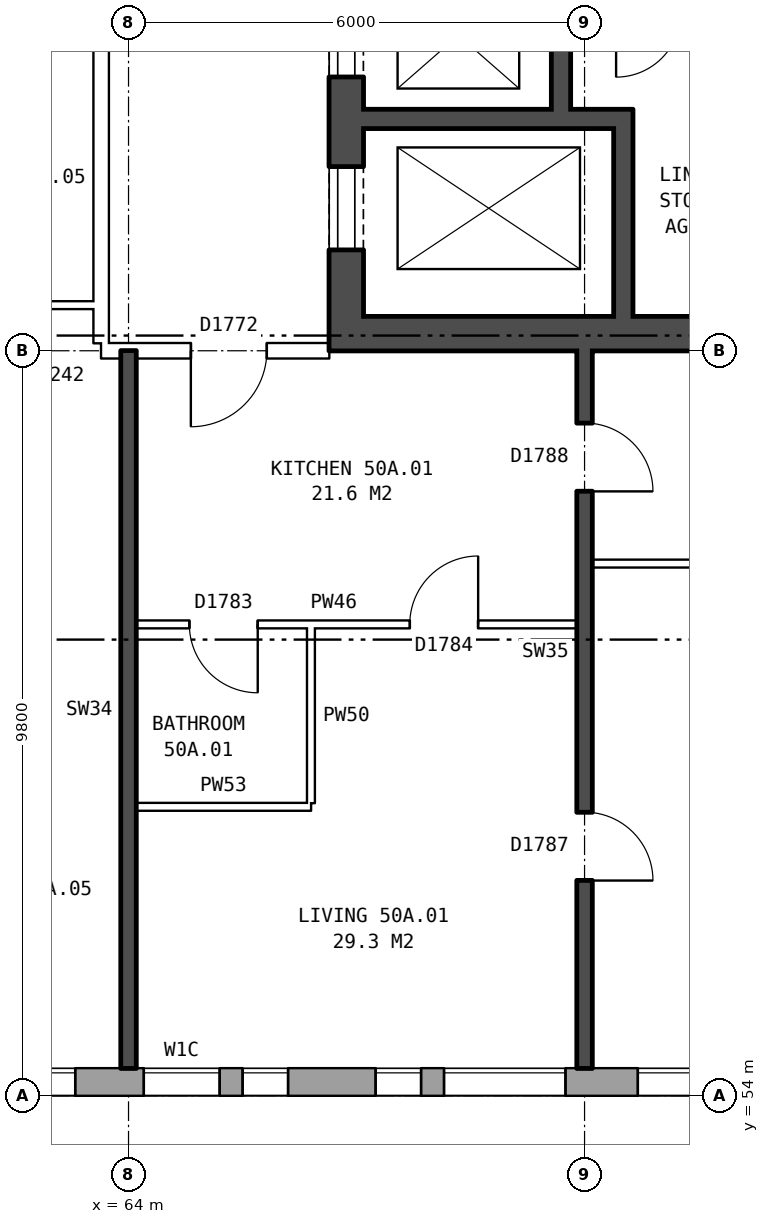
"""IFC4 building model, lengths in metres.
Left out: names, types, materials, properties, quantities, classifications, styles, units other than length and angle.
Written with IfcOpenShell. Run it as: python <this file> out.ifc"""

import sys

from ifc_helpers import new_model, si_unit, direction, frame, frame_2d, origin, place, context, subcontext, project, spatial, rectangle, extrude, element, fill, save


model = new_model("IFC4")
c1 = context("Model", 3, precision=1e-05, world=origin(), true_north=direction((0.0, 1.0)))
c2 = subcontext(c1, "Body", "Model", "MODEL_VIEW")
j1 = project(units=[si_unit("LENGTHUNIT", "METRE"), si_unit("PLANEANGLEUNIT", "RADIAN")], contexts=[c1])
p1 = place(None, origin())
s1 = spatial("IfcSite", under=j1, at=p1, CompositionType="ELEMENT")
p2 = place(p1, origin())
s2 = spatial("IfcBuilding", under=s1, at=p2, CompositionType="ELEMENT")
p3 = place(p2, frame((0.0, 0.0, 178.9)))
s3 = spatial("IfcBuildingStorey", under=s2, at=p3, CompositionType="ELEMENT", Elevation=178.9)
p4 = place(p3, frame((33.325, 54.18, 0.0), z_axis=(0.0, 0.0, 1.0), x_axis=(1.0, 0.0, 0.0)))
e1 = element("IfcWall", 1, at=p4, inside=s3, PredefinedType="STANDARD", context=c2, shape_type="SweptSolid", body=[
    extrude(rectangle(XDim=39.601, YDim=0.36, at=frame_2d((19.8, 0.0))), origin(), (0.0, 0.0, 1.0), 2.85),
])
p5 = place(p4, frame((1.375, 0.0, 0.8)))
e2 = element("IfcOpeningElement", 2, at=p5, cuts=e1, PredefinedType="OPENING", context=c2, shape_type="SweptSolid", body=[
    extrude(rectangle(XDim=1.6, YDim=1.8, at=frame_2d((0.8, 0.9))), frame((0.0, 0.19, 0.0), z_axis=(0.0, -1.0, 0.0), x_axis=(1.0, 0.0, 0.0)), (0.0, 0.0, 1.0), 0.38),
])
p6 = place(p4, frame((3.275, 0.0, 0.8)))
e3 = element("IfcOpeningElement", 3, at=p6, cuts=e1, PredefinedType="OPENING", context=c2, shape_type="SweptSolid", body=[
    extrude(rectangle(XDim=1.4, YDim=1.8, at=frame_2d((0.7, 0.9))), frame((0.0, 0.19, 0.0), z_axis=(0.0, -1.0, 0.0), x_axis=(1.0, 0.0, 0.0)), (0.0, 0.0, 1.0), 0.38),
])
p7 = place(p4, frame((7.375, 0.0, 0.8)))
e4 = element("IfcOpeningElement", 4, at=p7, cuts=e1, PredefinedType="OPENING", context=c2, shape_type="SweptSolid", body=[
    extrude(rectangle(XDim=1.6, YDim=1.8, at=frame_2d((0.8, 0.9))), frame((0.0, 0.19, 0.0), z_axis=(0.0, -1.0, 0.0), x_axis=(1.0, 0.0, 0.0)), (0.0, 0.0, 1.0), 0.38),
])
p8 = place(p4, frame((10.375, 0.0, 0.8)))
e5 = element("IfcOpeningElement", 5, at=p8, cuts=e1, PredefinedType="OPENING", context=c2, shape_type="SweptSolid", body=[
    extrude(rectangle(XDim=1.6, YDim=1.8, at=frame_2d((0.8, 0.9))), frame((0.0, 0.19, 0.0), z_axis=(0.0, -1.0, 0.0), x_axis=(1.0, 0.0, 0.0)), (0.0, 0.0, 1.0), 0.38),
])
p9 = place(p4, frame((13.375, 0.0, 0.8)))
e6 = element("IfcOpeningElement", 6, at=p9, cuts=e1, PredefinedType="OPENING", context=c2, shape_type="SweptSolid", body=[
    extrude(rectangle(XDim=1.6, YDim=1.8, at=frame_2d((0.8, 0.9))), frame((0.0, 0.19, 0.0), z_axis=(0.0, -1.0, 0.0), x_axis=(1.0, 0.0, 0.0)), (0.0, 0.0, 1.0), 0.38),
])
p10 = place(p4, frame((16.375, 0.0, 0.8)))
e7 = element("IfcOpeningElement", 7, at=p10, cuts=e1, PredefinedType="OPENING", context=c2, shape_type="SweptSolid", body=[
    extrude(rectangle(XDim=1.6, YDim=1.8, at=frame_2d((0.8, 0.9))), frame((0.0, 0.19, 0.0), z_axis=(0.0, -1.0, 0.0), x_axis=(1.0, 0.0, 0.0)), (0.0, 0.0, 1.0), 0.38),
])
p11 = place(p4, frame((19.375, 0.0, 0.8)))
e8 = element("IfcOpeningElement", 8, at=p11, cuts=e1, PredefinedType="OPENING", context=c2, shape_type="SweptSolid", body=[
    extrude(rectangle(XDim=1.6, YDim=1.8, at=frame_2d((0.8, 0.9))), frame((0.0, 0.19, 0.0), z_axis=(0.0, -1.0, 0.0), x_axis=(1.0, 0.0, 0.0)), (0.0, 0.0, 1.0), 0.38),
])
p12 = place(p4, frame((22.375, 0.0, 0.8)))
e9 = element("IfcOpeningElement", 9, at=p12, cuts=e1, PredefinedType="OPENING", context=c2, shape_type="SweptSolid", body=[
    extrude(rectangle(XDim=1.6, YDim=1.8, at=frame_2d((0.8, 0.9))), frame((0.0, 0.19, 0.0), z_axis=(0.0, -1.0, 0.0), x_axis=(1.0, 0.0, 0.0)), (0.0, 0.0, 1.0), 0.38),
])
p13 = place(p4, frame((25.375, 0.0, 0.8)))
e10 = element("IfcOpeningElement", 10, at=p13, cuts=e1, PredefinedType="OPENING", context=c2, shape_type="SweptSolid", body=[
    extrude(rectangle(XDim=1.6, YDim=1.8, at=frame_2d((0.8, 0.9))), frame((0.0, 0.19, 0.0), z_axis=(0.0, -1.0, 0.0), x_axis=(1.0, 0.0, 0.0)), (0.0, 0.0, 1.0), 0.38),
])
p14 = place(p4, frame((28.375, 0.0, 0.8)))
e11 = element("IfcOpeningElement", 11, at=p14, cuts=e1, PredefinedType="OPENING", context=c2, shape_type="SweptSolid", body=[
    extrude(rectangle(XDim=1.6, YDim=1.8, at=frame_2d((0.8, 0.9))), frame((0.0, 0.19, 0.0), z_axis=(0.0, -1.0, 0.0), x_axis=(1.0, 0.0, 0.0)), (0.0, 0.0, 1.0), 0.38),
])
p15 = place(p4, frame((30.875, 0.0, 0.8)))
e12 = element("IfcOpeningElement", 12, at=p15, cuts=e1, PredefinedType="OPENING", context=c2, shape_type="SweptSolid", body=[
    extrude(rectangle(XDim=1.0, YDim=1.8, at=frame_2d((0.5, 0.9))), frame((0.0, 0.19, 0.0), z_axis=(0.0, -1.0, 0.0), x_axis=(1.0, 0.0, 0.0)), (0.0, 0.0, 1.0), 0.38),
])
p16 = place(p4, frame((32.175, 0.0, 0.8)))
e13 = element("IfcOpeningElement", 13, at=p16, cuts=e1, PredefinedType="OPENING", context=c2, shape_type="SweptSolid", body=[
    extrude(rectangle(XDim=0.6, YDim=0.9, at=frame_2d((0.3, 0.45))), frame((0.0, 0.19, 0.0), z_axis=(0.0, -1.0, 0.0), x_axis=(1.0, 0.0, 0.0)), (0.0, 0.0, 1.0), 0.38),
])
p17 = place(p4, frame((37.375, 0.0, 0.8)))
e14 = element("IfcOpeningElement", 14, at=p17, cuts=e1, PredefinedType="OPENING", context=c2, shape_type="SweptSolid", body=[
    extrude(rectangle(XDim=1.6, YDim=1.8, at=frame_2d((0.8, 0.9))), frame((0.0, 0.19, 0.0), z_axis=(0.0, -1.0, 0.0), x_axis=(1.0, 0.0, 0.0)), (0.0, 0.0, 1.0), 0.38),
])
p18 = place(p4, frame((4.975, 0.0, 1.6)))
e15 = element("IfcOpeningElement", 15, at=p18, cuts=e1, PredefinedType="OPENING", context=c2, shape_type="SweptSolid", body=[
    extrude(rectangle(XDim=0.6, YDim=0.9, at=frame_2d((0.3, 0.45))), frame((0.0, 0.19, 0.0), z_axis=(0.0, -1.0, 0.0), x_axis=(1.0, 0.0, 0.0)), (0.0, 0.0, 1.0), 0.38),
])
p19 = place(p4, frame((33.925, 0.0, 1.7)))
e16 = element("IfcOpeningElement", 16, at=p19, cuts=e1, PredefinedType="OPENING", context=c2, shape_type="SweptSolid", body=[
    extrude(rectangle(XDim=0.6, YDim=0.9, at=frame_2d((0.3, 0.45))), frame((0.0, 0.19, 0.0), z_axis=(0.0, -1.0, 0.0), x_axis=(1.0, 0.0, 0.0)), (0.0, 0.0, 1.0), 0.38),
])
p20 = place(p4, frame((34.825, 0.0, 0.8)))
e17 = element("IfcOpeningElement", 17, at=p20, cuts=e1, PredefinedType="OPENING", context=c2, shape_type="SweptSolid", body=[
    extrude(rectangle(XDim=1.6, YDim=1.8, at=frame_2d((0.8, 0.9))), frame((0.0, 0.19, 0.0), z_axis=(0.0, -1.0, 0.0), x_axis=(1.0, 0.0, 0.0)), (0.0, 0.0, 1.0), 0.38),
])
p21 = place(p3, frame((66.865, 63.8, 0.0), z_axis=(0.0, 0.0, 1.0), x_axis=(0.0, 1.0, 0.0)))
e18 = element("IfcWall", 18, at=p21, inside=s3, PredefinedType="SHEAR", context=c2, shape_type="SweptSolid", body=[
    extrude(rectangle(XDim=12.4, YDim=0.45, at=frame_2d((6.2, 0.0))), origin(), (0.0, 0.0, 1.0), 2.85),
])
p22 = place(p21, frame((1.325, 0.0, 0.0)))
e19 = element("IfcOpeningElement", 19, at=p22, cuts=e18, PredefinedType="OPENING", context=c2, shape_type="SweptSolid", body=[
    extrude(rectangle(XDim=1.1, YDim=2.1, at=frame_2d((0.55, 1.05))), frame((0.0, 0.235, 0.0), z_axis=(0.0, -1.0, 0.0), x_axis=(1.0, 0.0, 0.0)), (0.0, 0.0, 1.0), 0.47),
])
p23 = place(p21, frame((3.6, 0.0, 0.0)))
e20 = element("IfcOpeningElement", 20, at=p23, cuts=e18, PredefinedType="OPENING", context=c2, shape_type="SweptSolid", body=[
    extrude(rectangle(XDim=1.1, YDim=2.1, at=frame_2d((0.55, 1.05))), frame((0.0, 0.235, 0.0), z_axis=(0.0, -1.0, 0.0), x_axis=(1.0, 0.0, 0.0)), (0.0, 0.0, 1.0), 0.47),
])
p24 = place(p21, frame((5.8, 0.0, 0.0)))
e21 = element("IfcOpeningElement", 21, at=p24, cuts=e18, PredefinedType="OPENING", context=c2, shape_type="SweptSolid", body=[
    extrude(rectangle(XDim=1.1, YDim=2.1, at=frame_2d((0.55, 1.05))), frame((0.0, 0.235, 0.0), z_axis=(0.0, -1.0, 0.0), x_axis=(1.0, 0.0, 0.0)), (0.0, 0.0, 1.0), 0.47),
])
p25 = place(p21, frame((8.0, 0.0, 0.0)))
e22 = element("IfcOpeningElement", 22, at=p25, cuts=e18, PredefinedType="OPENING", context=c2, shape_type="SweptSolid", body=[
    extrude(rectangle(XDim=1.1, YDim=2.1, at=frame_2d((0.55, 1.05))), frame((0.0, 0.235, 0.0), z_axis=(0.0, -1.0, 0.0), x_axis=(1.0, 0.0, 0.0)), (0.0, 0.0, 1.0), 0.47),
])
p26 = place(p21, frame((9.9, 0.0, 0.0)))
e23 = element("IfcOpeningElement", 23, at=p26, cuts=e18, PredefinedType="OPENING", context=c2, shape_type="SweptSolid", body=[
    extrude(rectangle(XDim=1.1, YDim=2.1, at=frame_2d((0.55, 1.05))), frame((0.0, 0.235, 0.0), z_axis=(0.0, -1.0, 0.0), x_axis=(1.0, 0.0, 0.0)), (0.0, 0.0, 1.0), 0.47),
])
p27 = place(p3, frame((67.09, 64.025, 0.0), z_axis=(0.0, 0.0, 1.0), x_axis=(1.0, 0.0, 0.0)))
e24 = element("IfcWall", 24, at=p27, inside=s3, PredefinedType="SHEAR", context=c2, shape_type="SweptSolid", body=[
    extrude(rectangle(XDim=8.1, YDim=0.45, at=frame_2d((4.05, 0.0))), origin(), (0.0, 0.0, 1.0), 2.85),
])
p28 = place(p3, frame((67.09, 66.85, 0.0), z_axis=(0.0, 0.0, 1.0), x_axis=(1.0, 0.0, 0.0)))
e25 = element("IfcWall", 25, at=p28, inside=s3, PredefinedType="SHEAR", context=c2, shape_type="SweptSolid", body=[
    extrude(rectangle(XDim=3.545, YDim=0.25, at=frame_2d((1.772, 0.0))), origin(), (0.0, 0.0, 1.0), 2.85),
])
p29 = place(p3, frame((69.69, 66.975, 0.0), z_axis=(0.0, 0.0, 1.0), x_axis=(0.0, 1.0, 0.0)))
e26 = element("IfcWall", 26, at=p29, inside=s3, PredefinedType="SHEAR", context=c2, shape_type="SweptSolid", body=[
    extrude(rectangle(XDim=6.6, YDim=0.25, at=frame_2d((3.3, 0.0))), origin(), (0.0, 0.0, 1.0), 2.85),
])
p30 = place(p3, frame((70.51, 64.25, 0.0), z_axis=(0.0, 0.0, 1.0), x_axis=(0.0, 1.0, 0.0)))
e27 = element("IfcWall", 27, at=p30, inside=s3, PredefinedType="SHEAR", context=c2, shape_type="SweptSolid", body=[
    extrude(rectangle(XDim=2.475, YDim=0.25, at=frame_2d((1.238, 0.0))), origin(), (0.0, 0.0, 1.0), 2.85),
])
p31 = place(p3, frame((63.64, 63.9, 0.0), z_axis=(0.0, 0.0, 1.0), x_axis=(0.0, 1.0, 0.0)))
e28 = element("IfcWall", 28, at=p31, inside=s3, PredefinedType="PARTITIONING", context=c2, shape_type="SweptSolid", body=[
    extrude(rectangle(XDim=12.2, YDim=0.2, at=frame_2d((6.1, 0.0))), origin(), (0.0, 0.0, 1.0), 2.85),
])
p32 = place(p31, frame((5.1, 0.0, 0.0)))
e29 = element("IfcOpeningElement", 29, at=p32, cuts=e28, PredefinedType="OPENING", context=c2, shape_type="SweptSolid", body=[
    extrude(rectangle(XDim=2.0, YDim=2.1, at=frame_2d((1.0, 1.05))), frame((0.0, 0.11, 0.0), z_axis=(0.0, -1.0, 0.0), x_axis=(1.0, 0.0, 0.0)), (0.0, 0.0, 1.0), 0.22),
])
p33 = place(p3, frame((64.1, 57.8, 0.0), z_axis=(0.0, 0.0, 1.0), x_axis=(1.0, 0.0, 0.0)))
e30 = element("IfcWall", 30, at=p33, inside=s3, PredefinedType="PARTITIONING", context=c2, shape_type="SweptSolid", body=[
    extrude(rectangle(XDim=2.3, YDim=0.1, at=frame_2d((1.15, 0.0))), origin(), (0.0, 0.0, 1.0), 2.85),
])
p34 = place(p3, frame((64.1, 60.2, 0.0), z_axis=(0.0, 0.0, 1.0), x_axis=(1.0, 0.0, 0.0)))
e31 = element("IfcWall", 31, at=p34, inside=s3, PredefinedType="PARTITIONING", context=c2, shape_type="SweptSolid", body=[
    extrude(rectangle(XDim=5.8, YDim=0.1, at=frame_2d((2.9, 0.0))), origin(), (0.0, 0.0, 1.0), 2.85),
])
p35 = place(p34, frame((3.6, 0.0, 0.0)))
e32 = element("IfcOpeningElement", 32, at=p35, cuts=e31, PredefinedType="OPENING", context=c2, shape_type="SweptSolid", body=[
    extrude(rectangle(XDim=0.9, YDim=2.1, at=frame_2d((0.45, 1.05))), frame((0.0, 0.06, 0.0), z_axis=(0.0, -1.0, 0.0), x_axis=(1.0, 0.0, 0.0)), (0.0, 0.0, 1.0), 0.12),
])
p36 = place(p34, frame((0.7, 0.0, 0.0)))
e33 = element("IfcOpeningElement", 33, at=p36, cuts=e31, PredefinedType="OPENING", context=c2, shape_type="SweptSolid", body=[
    extrude(rectangle(XDim=0.9, YDim=2.1, at=frame_2d((0.45, 1.05))), frame((0.0, 0.06, 0.0), z_axis=(0.0, -1.0, 0.0), x_axis=(1.0, 0.0, 0.0)), (0.0, 0.0, 1.0), 0.12),
])
p37 = place(p3, frame((70.1, 61.0, 0.0), z_axis=(0.0, 0.0, 1.0), x_axis=(1.0, 0.0, 0.0)))
e34 = element("IfcWall", 34, at=p37, inside=s3, PredefinedType="PARTITIONING", context=c2, shape_type="SweptSolid", body=[
    extrude(rectangle(XDim=5.54, YDim=0.1, at=frame_2d((2.77, 0.0))), origin(), (0.0, 0.0, 1.0), 2.85),
])
p38 = place(p3, frame((63.64, 63.8, 0.0), z_axis=(0.0, 0.0, 1.0), x_axis=(1.0, 0.0, 0.0)))
e35 = element("IfcWall", 35, at=p38, inside=s3, PredefinedType="PARTITIONING", context=c2, shape_type="SweptSolid", body=[
    extrude(rectangle(XDim=3.0, YDim=0.2, at=frame_2d((1.5, 0.0))), origin(), (0.0, 0.0, 1.0), 2.85),
])
p39 = place(p38, frame((1.18, 0.0, 0.0)))
e36 = element("IfcOpeningElement", 36, at=p39, cuts=e35, PredefinedType="OPENING", context=c2, shape_type="SweptSolid", body=[
    extrude(rectangle(XDim=1.0, YDim=2.1, at=frame_2d((0.5, 1.05))), frame((0.0, 0.11, 0.0), z_axis=(0.0, -1.0, 0.0), x_axis=(1.0, 0.0, 0.0)), (0.0, 0.0, 1.0), 0.22),
])
p40 = place(p3, frame((61.0, 64.4, 0.0), z_axis=(0.0, 0.0, 1.0), x_axis=(1.0, 0.0, 0.0)))
e37 = element("IfcWall", 37, at=p40, inside=s3, PredefinedType="PARTITIONING", context=c2, shape_type="SweptSolid", body=[
    extrude(rectangle(XDim=2.64, YDim=0.1, at=frame_2d((1.32, 0.0))), origin(), (0.0, 0.0, 1.0), 2.85),
])
p41 = place(p3, frame((64.0, 54.36, 0.0), z_axis=(0.0, 0.0, 1.0), x_axis=(0.0, 1.0, 0.0)))
e38 = element("IfcWall", 38, at=p41, inside=s3, PredefinedType="SOLIDWALL", context=c2, shape_type="SweptSolid", body=[
    extrude(rectangle(XDim=9.44, YDim=0.2, at=frame_2d((4.72, 0.0))), origin(), (0.0, 0.0, 1.0), 2.85),
])
p42 = place(p3, frame((66.4, 57.85, 0.0), z_axis=(0.0, 0.0, 1.0), x_axis=(0.0, 1.0, 0.0)))
e39 = element("IfcWall", 39, at=p42, inside=s3, PredefinedType="PARTITIONING", context=c2, shape_type="SweptSolid", body=[
    extrude(rectangle(XDim=2.3, YDim=0.1, at=frame_2d((1.15, 0.0))), origin(), (0.0, 0.0, 1.0), 2.85),
])
p43 = place(p3, frame((70.0, 54.36, 0.0), z_axis=(0.0, 0.0, 1.0), x_axis=(0.0, 1.0, 0.0)))
e40 = element("IfcWall", 40, at=p43, inside=s3, PredefinedType="SOLIDWALL", context=c2, shape_type="SweptSolid", body=[
    extrude(rectangle(XDim=9.44, YDim=0.2, at=frame_2d((4.72, 0.0))), origin(), (0.0, 0.0, 1.0), 2.85),
])
p44 = place(p43, frame((2.47, 0.0, 0.0)))
e41 = element("IfcOpeningElement", 41, at=p44, cuts=e40, PredefinedType="OPENING", context=c2, shape_type="SweptSolid", body=[
    extrude(rectangle(XDim=0.9, YDim=2.1, at=frame_2d((0.45, 1.05))), frame((0.0, 0.11, 0.0), z_axis=(0.0, -1.0, 0.0), x_axis=(1.0, 0.0, 0.0)), (0.0, 0.0, 1.0), 0.22),
])
p45 = place(p43, frame((7.59, 0.0, 0.0)))
e42 = element("IfcOpeningElement", 42, at=p45, cuts=e40, PredefinedType="OPENING", context=c2, shape_type="SweptSolid", body=[
    extrude(rectangle(XDim=0.9, YDim=2.1, at=frame_2d((0.45, 1.05))), frame((0.0, 0.11, 0.0), z_axis=(0.0, -1.0, 0.0), x_axis=(1.0, 0.0, 0.0)), (0.0, 0.0, 1.0), 0.22),
])
p46 = place(p14, origin())
e43 = element("IfcWindow", 43, at=p46, inside=s3, PartitioningType="SINGLE_PANEL", PredefinedType="WINDOW", context=c2, shape_type="SweptSolid", body=[
    extrude(rectangle(XDim=1.6, YDim=1.8, at=frame_2d((0.8, 0.9))), frame((0.0, 0.15, 0.0), z_axis=(0.0, -1.0, 0.0), x_axis=(1.0, 0.0, 0.0)), (0.0, 0.0, 1.0), 0.06),
])
fill(e11, e43)
p47 = place(p15, origin())
e44 = element("IfcWindow", 44, at=p47, inside=s3, PartitioningType="SINGLE_PANEL", PredefinedType="WINDOW", context=c2, shape_type="SweptSolid", body=[
    extrude(rectangle(XDim=1.0, YDim=1.8, at=frame_2d((0.5, 0.9))), frame((0.0, 0.15, 0.0), z_axis=(0.0, -1.0, 0.0), x_axis=(1.0, 0.0, 0.0)), (0.0, 0.0, 1.0), 0.06),
])
fill(e12, e44)
p48 = place(p16, origin())
e45 = element("IfcWindow", 45, at=p48, inside=s3, PartitioningType="SINGLE_PANEL", PredefinedType="WINDOW", context=c2, shape_type="SweptSolid", body=[
    extrude(rectangle(XDim=0.6, YDim=0.9, at=frame_2d((0.3, 0.45))), frame((0.0, 0.15, 0.0), z_axis=(0.0, -1.0, 0.0), x_axis=(1.0, 0.0, 0.0)), (0.0, 0.0, 1.0), 0.06),
])
fill(e13, e45)
p49 = place(p17, origin())
e46 = element("IfcWindow", 46, at=p49, inside=s3, PartitioningType="SINGLE_PANEL", PredefinedType="WINDOW", context=c2, shape_type="SweptSolid", body=[
    extrude(rectangle(XDim=1.6, YDim=1.8, at=frame_2d((0.8, 0.9))), frame((0.0, 0.15, 0.0), z_axis=(0.0, -1.0, 0.0), x_axis=(1.0, 0.0, 0.0)), (0.0, 0.0, 1.0), 0.06),
])
fill(e14, e46)
p50 = place(p22, origin())
e47 = element("IfcDoor", 47, at=p50, inside=s3, OperationType="DOUBLE_DOOR_SLIDING", PredefinedType="DOOR", context=c2, shape_type="SweptSolid", body=[
    extrude(rectangle(XDim=1.1, YDim=2.1, at=frame_2d((0.55, 1.05))), frame((0.0, -0.16, 0.0), z_axis=(0.0, -1.0, 0.0), x_axis=(1.0, 0.0, 0.0)), (0.0, 0.0, 1.0), 0.05),
])
fill(e19, e47)
p51 = place(p23, origin())
e48 = element("IfcDoor", 48, at=p51, inside=s3, OperationType="DOUBLE_DOOR_SLIDING", PredefinedType="DOOR", context=c2, shape_type="SweptSolid", body=[
    extrude(rectangle(XDim=1.1, YDim=2.1, at=frame_2d((0.55, 1.05))), frame((0.0, -0.16, 0.0), z_axis=(0.0, -1.0, 0.0), x_axis=(1.0, 0.0, 0.0)), (0.0, 0.0, 1.0), 0.05),
])
fill(e20, e48)
p52 = place(p44, frame((0.9, 0.0, 0.0), z_axis=(0.0, 0.0, 1.0), x_axis=(-1.0, 0.0, 0.0)))
e49 = element("IfcDoor", 49, at=p52, inside=s3, OperationType="SINGLE_SWING_RIGHT", PredefinedType="DOOR", context=c2, shape_type="SweptSolid", body=[
    extrude(rectangle(XDim=0.9, YDim=2.1, at=frame_2d((0.45, 1.05))), frame((0.0, 0.025, 0.0), z_axis=(0.0, -1.0, 0.0), x_axis=(1.0, 0.0, 0.0)), (0.0, 0.0, 1.0), 0.05),
])
fill(e41, e49)
p53 = place(p45, frame((0.9, 0.0, 0.0), z_axis=(0.0, 0.0, 1.0), x_axis=(-1.0, 0.0, 0.0)))
e50 = element("IfcDoor", 50, at=p53, inside=s3, OperationType="SINGLE_SWING_RIGHT", PredefinedType="DOOR", context=c2, shape_type="SweptSolid", body=[
    extrude(rectangle(XDim=0.9, YDim=2.1, at=frame_2d((0.45, 1.05))), frame((0.0, 0.025, 0.0), z_axis=(0.0, -1.0, 0.0), x_axis=(1.0, 0.0, 0.0)), (0.0, 0.0, 1.0), 0.05),
])
fill(e42, e50)
p54 = place(p39, frame((1.0, 0.0, 0.0), z_axis=(0.0, 0.0, 1.0), x_axis=(-1.0, 0.0, 0.0)))
e51 = element("IfcDoor", 51, at=p54, inside=s3, OperationType="SINGLE_SWING_RIGHT", PredefinedType="DOOR", context=c2, shape_type="SweptSolid", body=[
    extrude(rectangle(XDim=1.0, YDim=2.1, at=frame_2d((0.5, 1.05))), frame((0.0, 0.025, 0.0), z_axis=(0.0, -1.0, 0.0), x_axis=(1.0, 0.0, 0.0)), (0.0, 0.0, 1.0), 0.05),
])
fill(e36, e51)
p55 = place(p35, origin())
e52 = element("IfcDoor", 52, at=p55, inside=s3, OperationType="SINGLE_SWING_RIGHT", PredefinedType="DOOR", context=c2, shape_type="SweptSolid", body=[
    extrude(rectangle(XDim=0.9, YDim=2.1, at=frame_2d((0.45, 1.05))), frame((0.0, 0.025, 0.0), z_axis=(0.0, -1.0, 0.0), x_axis=(1.0, 0.0, 0.0)), (0.0, 0.0, 1.0), 0.05),
])
fill(e32, e52)
p56 = place(p36, frame((0.9, 0.0, 0.0), z_axis=(0.0, 0.0, 1.0), x_axis=(-1.0, 0.0, 0.0)))
e53 = element("IfcDoor", 53, at=p56, inside=s3, OperationType="SINGLE_SWING_LEFT", PredefinedType="DOOR", context=c2, shape_type="SweptSolid", body=[
    extrude(rectangle(XDim=0.9, YDim=2.1, at=frame_2d((0.45, 1.05))), frame((0.0, 0.025, 0.0), z_axis=(0.0, -1.0, 0.0), x_axis=(1.0, 0.0, 0.0)), (0.0, 0.0, 1.0), 0.05),
])
fill(e33, e53)
p57 = place(p19, origin())
e54 = element("IfcWindow", 54, at=p57, inside=s3, PartitioningType="SINGLE_PANEL", PredefinedType="WINDOW", context=c2, shape_type="SweptSolid", body=[
    extrude(rectangle(XDim=0.6, YDim=0.9, at=frame_2d((0.3, 0.45))), frame((0.0, 0.15, 0.0), z_axis=(0.0, -1.0, 0.0), x_axis=(1.0, 0.0, 0.0)), (0.0, 0.0, 1.0), 0.06),
])
fill(e16, e54)
p58 = place(p20, origin())
e55 = element("IfcWindow", 55, at=p58, inside=s3, PartitioningType="SINGLE_PANEL", PredefinedType="WINDOW", context=c2, shape_type="SweptSolid", body=[
    extrude(rectangle(XDim=1.6, YDim=1.8, at=frame_2d((0.8, 0.9))), frame((0.0, 0.15, 0.0), z_axis=(0.0, -1.0, 0.0), x_axis=(1.0, 0.0, 0.0)), (0.0, 0.0, 1.0), 0.06),
])
fill(e17, e55)
save(model, sys.argv[1])
